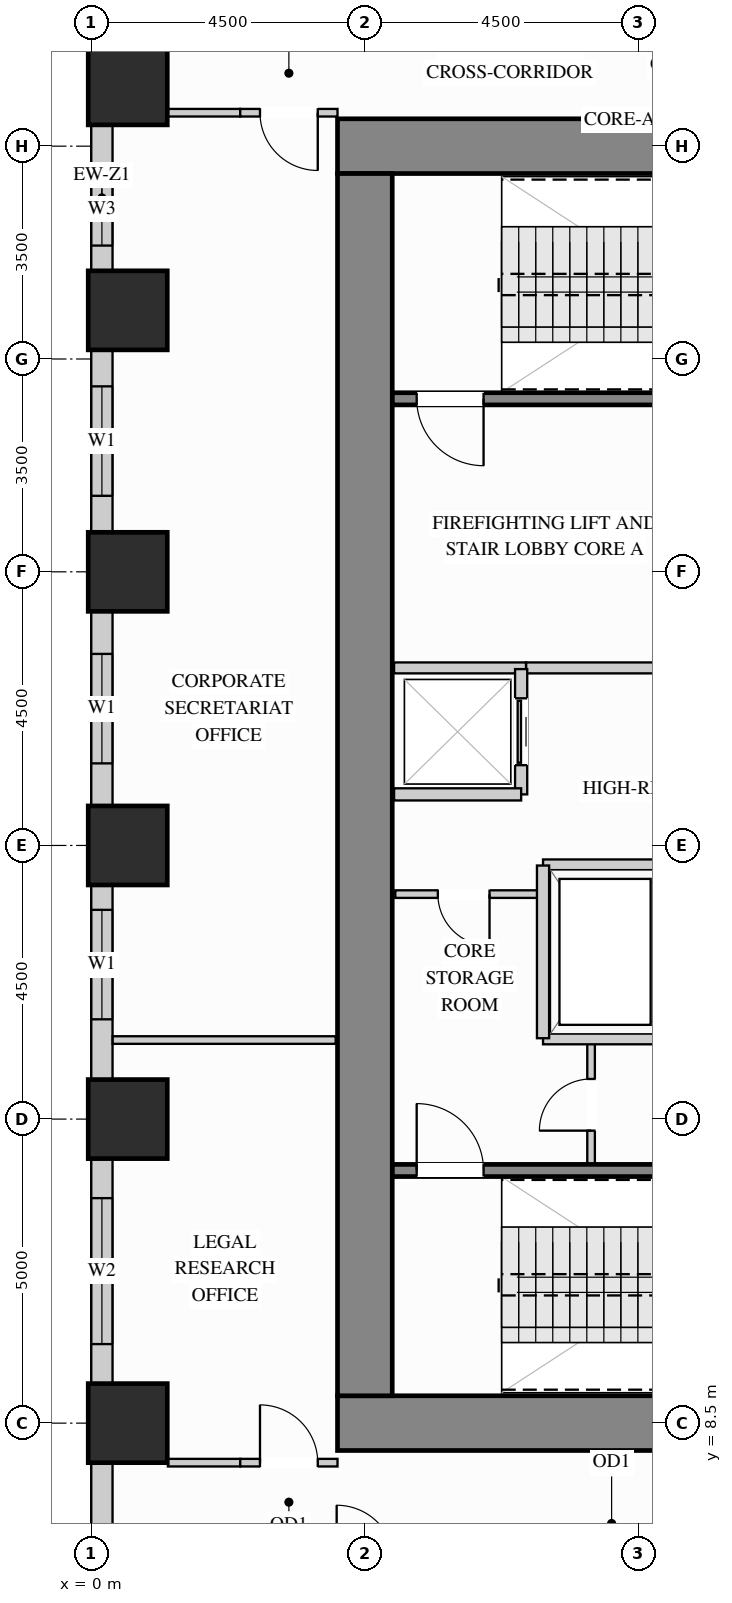
"""IFC4 building model, lengths in metres.
Left out: names, types, materials, properties, quantities, classifications, styles, units other than length and angle.
Written with IfcOpenShell. Run it as: python <this file> out.ifc"""

import sys

from ifc_helpers import new_model, si_unit, direction, frame, frame_2d, origin, origin_2d, place, context, subcontext, project, spatial, rectangle, extrude, source, transform, mapped, element, fill, save


model = new_model("IFC4")
c1 = context("Model", 3, precision=1e-05, world=origin(), true_north=direction((0.0, 1.0)))
c2 = subcontext(c1, "Body", "Model", "MODEL_VIEW")
j1 = project(units=[si_unit("LENGTHUNIT", "METRE"), si_unit("PLANEANGLEUNIT", "RADIAN")], contexts=[c1])
p1 = place(None, origin())
s1 = spatial("IfcSite", under=j1, at=p1, CompositionType="ELEMENT")
p2 = place(p1, origin())
s2 = spatial("IfcBuilding", under=s1, at=p2, CompositionType="ELEMENT")
p3 = place(p2, frame((0.0, 0.0, 29.7)))
s3 = spatial("IfcBuildingStorey", under=s2, at=p3, CompositionType="ELEMENT", Elevation=29.7)
m1 = source(origin(), c2, "Body", "SweptSolid", [
    extrude(rectangle(XDim=1.3, YDim=1.3, at=origin_2d()), origin(), (0.0, 0.0, 1.0), 3.38),
])
for number, where, z_axis, x_axis in (
    (1, (0.6, 13.5, 0.0), (0.0, 0.0, 1.0), (1.0, 0.0, 0.0)),
    (2, (0.6, 18.0, 0.0), (0.0, 0.0, 1.0), (1.0, 0.0, 0.0)),
    (3, (0.6, 22.5, 0.0), (0.0, 0.0, 1.0), (1.0, 0.0, 0.0)),
    (4, (0.6, 26.8, 0.0), (0.0, 0.0, 1.0), (1.0, 0.0, 0.0)),
    (5, (0.6, 30.5, 0.0), (0.0, 0.0, 1.0), (1.0, 0.0, 0.0)),
    (6, (0.6, 8.5, 0.0), (0.0, 0.0, 1.0), (1.0, 0.0, 0.0)),
):
    element("IfcColumn", number, at=place(p3, frame(where, z_axis=z_axis, x_axis=x_axis)), inside=s3, PredefinedType="COLUMN", context=c2, shape_type="MappedRepresentation", body=[
        mapped(m1, transform((0.0, 0.0, 0.0), x_axis=(1.0, 0.0, 0.0), y_axis=(0.0, 1.0, 0.0), z_axis=(0.0, 0.0, 1.0))),
    ])
m2 = source(origin(), c2, "Body", "SweptSolid", [
    extrude(rectangle(XDim=10.9, YDim=0.9, at=frame_2d((5.45, 0.0))), origin(), (0.0, 0.0, 1.0), 3.38),
])
for number, where, z_axis, x_axis in (
    (7, (4.05, 29.5, 0.0), (0.0, 0.0, 1.0), (1.0, 0.0, 0.0)),
    (8, (4.05, 8.5, 0.0), (0.0, 0.0, 1.0), (1.0, 0.0, 0.0)),
):
    element("IfcWall", number, at=place(p3, frame(where, z_axis=z_axis, x_axis=x_axis)), inside=s3, PredefinedType="SHEAR", context=c2, shape_type="MappedRepresentation", body=[
        mapped(m2, transform((0.0, 0.0, 0.0), x_axis=(1.0, 0.0, 0.0), y_axis=(0.0, 1.0, 0.0), z_axis=(0.0, 0.0, 1.0))),
    ])
m3 = source(origin(), c2, "Body", "SweptSolid", [
    extrude(rectangle(XDim=20.1, YDim=0.9, at=frame_2d((10.05, 0.0))), origin(), (0.0, 0.0, 1.0), 3.38),
])
p4 = place(p3, frame((4.5, 8.95, 0.0), z_axis=(0.0, 0.0, 1.0), x_axis=(0.0, 1.0, 0.0)))
e9 = element("IfcWall", 9, at=p4, inside=s3, PredefinedType="SHEAR", context=c2, shape_type="MappedRepresentation", body=[
    mapped(m3, transform((0.0, 0.0, 0.0), x_axis=(1.0, 0.0, 0.0), y_axis=(0.0, 1.0, 0.0), z_axis=(0.0, 0.0, 1.0))),
])
p5 = place(p3, frame((0.175, 29.852, 0.0), z_axis=(0.0, 0.0, 1.0), x_axis=(0.0, -1.0, 0.0)))
e10 = element("IfcWall", 10, at=p5, inside=s3, PredefinedType="SOLIDWALL", context=c2, shape_type="SweptSolid", body=[
    extrude(rectangle(XDim=2.404, YDim=0.35, at=frame_2d((1.202, 0.0))), origin(), (0.0, 0.0, 1.0), 2.51),
])
p6 = place(p5, frame((0.787, 0.0, 0.78)))
e11 = element("IfcOpeningElement", 11, at=p6, cuts=e10, PredefinedType="OPENING", context=c2, shape_type="SweptSolid", body=[
    extrude(rectangle(XDim=1.2, YDim=1.55, at=frame_2d((0.6, 0.775))), frame((0.0, 0.185, 0.0), z_axis=(0.0, -1.0, 0.0), x_axis=(1.0, 0.0, 0.0)), (0.0, 0.0, 1.0), 0.37),
])
p7 = place(p3, frame((0.175, 26.152, 0.0), z_axis=(0.0, 0.0, 1.0), x_axis=(0.0, -1.0, 0.0)))
e12 = element("IfcWall", 12, at=p7, inside=s3, PredefinedType="SOLIDWALL", context=c2, shape_type="SweptSolid", body=[
    extrude(rectangle(XDim=3.004, YDim=0.35, at=frame_2d((1.502, 0.0))), origin(), (0.0, 0.0, 1.0), 2.51),
])
p8 = place(p7, frame((0.602, 0.0, 0.78)))
e13 = element("IfcOpeningElement", 13, at=p8, cuts=e12, PredefinedType="OPENING", context=c2, shape_type="SweptSolid", body=[
    extrude(rectangle(XDim=1.8, YDim=1.55, at=frame_2d((0.9, 0.775))), frame((0.0, 0.185, 0.0), z_axis=(0.0, -1.0, 0.0), x_axis=(1.0, 0.0, 0.0)), (0.0, 0.0, 1.0), 0.37),
])
p9 = place(p3, frame((0.175, 21.852, 0.0), z_axis=(0.0, 0.0, 1.0), x_axis=(0.0, -1.0, 0.0)))
e14 = element("IfcWall", 14, at=p9, inside=s3, PredefinedType="SOLIDWALL", context=c2, shape_type="SweptSolid", body=[
    extrude(rectangle(XDim=3.204, YDim=0.35, at=frame_2d((1.602, 0.0))), origin(), (0.0, 0.0, 1.0), 2.51),
])
p10 = place(p9, frame((0.702, 0.0, 0.78)))
e15 = element("IfcOpeningElement", 15, at=p10, cuts=e14, PredefinedType="OPENING", context=c2, shape_type="SweptSolid", body=[
    extrude(rectangle(XDim=1.8, YDim=1.55, at=frame_2d((0.9, 0.775))), frame((0.0, 0.185, 0.0), z_axis=(0.0, -1.0, 0.0), x_axis=(1.0, 0.0, 0.0)), (0.0, 0.0, 1.0), 0.37),
])
p11 = place(p3, frame((0.175, 17.352, 0.0), z_axis=(0.0, 0.0, 1.0), x_axis=(0.0, -1.0, 0.0)))
e16 = element("IfcWall", 16, at=p11, inside=s3, PredefinedType="SOLIDWALL", context=c2, shape_type="SweptSolid", body=[
    extrude(rectangle(XDim=3.204, YDim=0.35, at=frame_2d((1.602, 0.0))), origin(), (0.0, 0.0, 1.0), 2.51),
])
p12 = place(p11, frame((0.411, 0.0, 0.78)))
e17 = element("IfcOpeningElement", 17, at=p12, cuts=e16, PredefinedType="OPENING", context=c2, shape_type="SweptSolid", body=[
    extrude(rectangle(XDim=1.8, YDim=1.55, at=frame_2d((0.9, 0.775))), frame((0.0, 0.185, 0.0), z_axis=(0.0, -1.0, 0.0), x_axis=(1.0, 0.0, 0.0)), (0.0, 0.0, 1.0), 0.37),
])
p13 = place(p3, frame((0.175, 12.852, 0.0), z_axis=(0.0, 0.0, 1.0), x_axis=(0.0, -1.0, 0.0)))
e18 = element("IfcWall", 18, at=p13, inside=s3, PredefinedType="SOLIDWALL", context=c2, shape_type="SweptSolid", body=[
    extrude(rectangle(XDim=3.704, YDim=0.35, at=frame_2d((1.852, 0.0))), origin(), (0.0, 0.0, 1.0), 2.51),
])
p14 = place(p13, frame((0.652, 0.0, 0.78)))
e19 = element("IfcOpeningElement", 19, at=p14, cuts=e18, PredefinedType="OPENING", context=c2, shape_type="SweptSolid", body=[
    extrude(rectangle(XDim=2.4, YDim=1.55, at=frame_2d((1.2, 0.775))), frame((0.0, 0.185, 0.0), z_axis=(0.0, -1.0, 0.0), x_axis=(1.0, 0.0, 0.0)), (0.0, 0.0, 1.0), 0.37),
])
p15 = place(p3, frame((0.175, 7.852, 0.0), z_axis=(0.0, 0.0, 1.0), x_axis=(0.0, -1.0, 0.0)))
e20 = element("IfcWall", 20, at=p15, inside=s3, PredefinedType="SOLIDWALL", context=c2, shape_type="SweptSolid", body=[
    extrude(rectangle(XDim=3.704, YDim=0.35, at=frame_2d((1.852, 0.0))), origin(), (0.0, 0.0, 1.0), 2.51),
])
p16 = place(p15, frame((2.043, 0.0, 0.78)))
e21 = element("IfcOpeningElement", 21, at=p16, cuts=e20, PredefinedType="OPENING", context=c2, shape_type="SweptSolid", body=[
    extrude(rectangle(XDim=1.2, YDim=1.55, at=frame_2d((0.6, 0.775))), frame((0.0, 0.185, 0.0), z_axis=(0.0, -1.0, 0.0), x_axis=(1.0, 0.0, 0.0)), (0.0, 0.0, 1.0), 0.37),
])
p17 = place(p3, frame((7.15, 20.92, 0.0), z_axis=(0.0, 0.0, 1.0), x_axis=(1.0, 0.0, 0.0)))
e22 = element("IfcWall", 22, at=p17, inside=s3, PredefinedType="PARTITIONING", context=c2, shape_type="SweptSolid", body=[
    extrude(rectangle(XDim=4.68, YDim=0.18, at=frame_2d((2.34, 0.0))), origin(), (0.0, 0.0, 1.0), 3.365),
])
p18 = place(p17, frame((2.2, 0.0, 0.0)))
e23 = element("IfcOpeningElement", 23, at=p18, cuts=e22, PredefinedType="OPENING", context=c2, shape_type="SweptSolid", body=[
    extrude(rectangle(XDim=1.1, YDim=2.15, at=frame_2d((0.55, 1.075))), frame((0.0, 0.1, 0.0), z_axis=(0.0, -1.0, 0.0), x_axis=(1.0, 0.0, 0.0)), (0.0, 0.0, 1.0), 0.2),
])
m4 = source(origin(), c2, "Body", "SweptSolid", [
    extrude(rectangle(XDim=2.17, YDim=0.18, at=frame_2d((1.085, 0.0))), origin(), (0.0, 0.0, 1.0), 3.365),
])
p19 = place(p3, frame((4.98, 20.92, 0.0), z_axis=(0.0, 0.0, 1.0), x_axis=(1.0, 0.0, 0.0)))
e24 = element("IfcWall", 24, at=p19, inside=s3, PredefinedType="PARTITIONING", context=c2, shape_type="MappedRepresentation", body=[
    mapped(m4, transform((0.0, 0.0, 0.0), x_axis=(1.0, 0.0, 0.0), y_axis=(0.0, 1.0, 0.0), z_axis=(0.0, 0.0, 1.0))),
])
p20 = place(p3, frame((8.22, 12.75, 0.0), z_axis=(0.0, 0.0, 1.0), x_axis=(0.0, 1.0, 0.0)))
e25 = element("IfcWall", 25, at=p20, inside=s3, PredefinedType="PARTITIONING", context=c2, shape_type="SweptSolid", body=[
    extrude(rectangle(XDim=2.07, YDim=0.125, at=frame_2d((1.035, 0.0))), origin(), (0.0, 0.0, 1.0), 3.365),
])
p21 = place(p20, frame((0.56, 0.0, 0.0)))
e26 = element("IfcOpeningElement", 26, at=p21, cuts=e25, PredefinedType="OPENING", context=c2, shape_type="SweptSolid", body=[
    extrude(rectangle(XDim=0.85, YDim=2.1, at=frame_2d((0.425, 1.05))), frame((0.0, 0.073, 0.0), z_axis=(0.0, -1.0, 0.0), x_axis=(1.0, 0.0, 0.0)), (0.0, 0.0, 1.0), 0.145),
])
p22 = place(p3, frame((5.0, 17.2, 0.0), z_axis=(0.0, 0.0, 1.0), x_axis=(1.0, 0.0, 0.0)))
e27 = element("IfcWall", 27, at=p22, inside=s3, PredefinedType="PARTITIONING", context=c2, shape_type="SweptSolid", body=[
    extrude(rectangle(XDim=2.4, YDim=0.125, at=frame_2d((1.2, 0.0))), origin(), (0.0, 0.0, 1.0), 3.365),
])
p23 = place(p22, frame((0.7, 0.0, 0.0)))
e28 = element("IfcOpeningElement", 28, at=p23, cuts=e27, PredefinedType="OPENING", context=c2, shape_type="SweptSolid", body=[
    extrude(rectangle(XDim=0.85, YDim=2.1, at=frame_2d((0.425, 1.05))), frame((0.0, 0.073, 0.0), z_axis=(0.0, -1.0, 0.0), x_axis=(1.0, 0.0, 0.0)), (0.0, 0.0, 1.0), 0.145),
])
m5 = source(origin(), c2, "Body", "SweptSolid", [
    extrude(rectangle(XDim=1.19, YDim=0.125, at=frame_2d((0.595, 0.0))), origin(), (0.0, 0.0, 1.0), 3.365),
])
p24 = place(p3, frame((1.26, 30.05, 0.0), z_axis=(0.0, 0.0, 1.0), x_axis=(1.0, 0.0, 0.0)))
e29 = element("IfcWall", 29, at=p24, inside=s3, PredefinedType="PARTITIONING", context=c2, shape_type="MappedRepresentation", body=[
    mapped(m5, transform((0.0, 0.0, 0.0), x_axis=(1.0, 0.0, 0.0), y_axis=(0.0, 1.0, 0.0), z_axis=(0.0, 0.0, 1.0))),
])
p25 = place(p3, frame((2.45, 30.05, 0.0), z_axis=(0.0, 0.0, 1.0), x_axis=(1.0, 0.0, 0.0)))
e30 = element("IfcWall", 30, at=p25, inside=s3, PredefinedType="PARTITIONING", context=c2, shape_type="SweptSolid", body=[
    extrude(rectangle(XDim=1.6, YDim=0.125, at=frame_2d((0.8, 0.0))), origin(), (0.0, 0.0, 1.0), 3.365),
])
p26 = place(p25, frame((0.325, 0.0, 0.0)))
e31 = element("IfcOpeningElement", 31, at=p26, cuts=e30, PredefinedType="OPENING", context=c2, shape_type="SweptSolid", body=[
    extrude(rectangle(XDim=0.95, YDim=2.15, at=frame_2d((0.475, 1.075))), frame((0.0, 0.073, 0.0), z_axis=(0.0, -1.0, 0.0), x_axis=(1.0, 0.0, 0.0)), (0.0, 0.0, 1.0), 0.145),
])
p27 = place(p3, frame((1.26, 7.85, 0.0), z_axis=(0.0, 0.0, 1.0), x_axis=(1.0, 0.0, 0.0)))
e32 = element("IfcWall", 32, at=p27, inside=s3, PredefinedType="PARTITIONING", context=c2, shape_type="MappedRepresentation", body=[
    mapped(m5, transform((0.0, 0.0, 0.0), x_axis=(1.0, 0.0, 0.0), y_axis=(0.0, 1.0, 0.0), z_axis=(0.0, 0.0, 1.0))),
])
p28 = place(p3, frame((2.45, 7.85, 0.0), z_axis=(0.0, 0.0, 1.0), x_axis=(1.0, 0.0, 0.0)))
e33 = element("IfcWall", 33, at=p28, inside=s3, PredefinedType="PARTITIONING", context=c2, shape_type="SweptSolid", body=[
    extrude(rectangle(XDim=1.6, YDim=0.125, at=frame_2d((0.8, 0.0))), origin(), (0.0, 0.0, 1.0), 3.365),
])
p29 = place(p28, frame((0.325, 0.0, 0.0)))
e34 = element("IfcOpeningElement", 34, at=p29, cuts=e33, PredefinedType="OPENING", context=c2, shape_type="SweptSolid", body=[
    extrude(rectangle(XDim=0.95, YDim=2.15, at=frame_2d((0.475, 1.075))), frame((0.0, 0.073, 0.0), z_axis=(0.0, -1.0, 0.0), x_axis=(1.0, 0.0, 0.0)), (0.0, 0.0, 1.0), 0.145),
])
m6 = source(origin(), c2, "Body", "SweptSolid", [
    extrude(rectangle(XDim=3.668, YDim=0.125, at=frame_2d((1.834, 0.0))), origin(), (0.0, 0.0, 1.0), 3.365),
])
p30 = place(p3, frame((0.352, 14.8, 0.0), z_axis=(0.0, 0.0, 1.0), x_axis=(1.0, 0.0, 0.0)))
e35 = element("IfcWall", 35, at=p30, inside=s3, PredefinedType="PARTITIONING", context=c2, shape_type="MappedRepresentation", body=[
    mapped(m6, transform((0.0, 0.0, 0.0), x_axis=(1.0, 0.0, 0.0), y_axis=(0.0, 1.0, 0.0), z_axis=(0.0, 0.0, 1.0))),
])
p31 = place(p3, frame((7.07, 18.84, 0.0), z_axis=(0.0, 0.0, 1.0), x_axis=(0.0, 1.0, 0.0)))
e36 = element("IfcWall", 36, at=p31, inside=s3, PredefinedType="PARTITIONING", context=c2, shape_type="SweptSolid", body=[
    extrude(rectangle(XDim=2.06, YDim=0.2, at=frame_2d((1.03, 0.0))), origin(), (0.0, 0.0, 1.0), 3.365),
])
p32 = place(p31, frame((0.48, 0.0, 0.0)))
e37 = element("IfcOpeningElement", 37, at=p32, cuts=e36, PredefinedType="OPENING", context=c2, shape_type="SweptSolid", body=[
    extrude(rectangle(XDim=1.1, YDim=2.2, at=frame_2d((0.55, 1.1))), frame((0.0, 0.11, 0.0), z_axis=(0.0, -1.0, 0.0), x_axis=(1.0, 0.0, 0.0)), (0.0, 0.0, 1.0), 0.22),
])
m7 = source(origin(), c2, "Body", "SweptSolid", [
    extrude(rectangle(XDim=2.09, YDim=0.2, at=frame_2d((1.045, 0.0))), origin(), (0.0, 0.0, 1.0), 3.365),
])
p33 = place(p3, frame((4.98, 18.84, 0.0), z_axis=(0.0, 0.0, 1.0), x_axis=(1.0, 0.0, 0.0)))
e38 = element("IfcWall", 38, at=p33, inside=s3, PredefinedType="PARTITIONING", context=c2, shape_type="MappedRepresentation", body=[
    mapped(m7, transform((0.0, 0.0, 0.0), x_axis=(1.0, 0.0, 0.0), y_axis=(0.0, 1.0, 0.0), z_axis=(0.0, 0.0, 1.0))),
])
m8 = source(origin(), c2, "Body", "SweptSolid", [
    extrude(rectangle(XDim=2.04, YDim=0.2, at=frame_2d((1.02, 0.0))), origin(), (0.0, 0.0, 1.0), 3.365),
])
for number, where, z_axis, x_axis in (
    (39, (7.43, 17.67, 0.0), (0.0, 0.0, 1.0), (1.0, 0.0, 0.0)),
    (40, (7.43, 14.83, 0.0), (0.0, 0.0, 1.0), (1.0, 0.0, 0.0)),
):
    element("IfcWall", number, at=place(p3, frame(where, z_axis=z_axis, x_axis=x_axis)), inside=s3, PredefinedType="PARTITIONING", context=c2, shape_type="MappedRepresentation", body=[
        mapped(m8, transform((0.0, 0.0, 0.0), x_axis=(1.0, 0.0, 0.0), y_axis=(0.0, 1.0, 0.0), z_axis=(0.0, 0.0, 1.0))),
    ])
m9 = source(origin(), c2, "Body", "SweptSolid", [
    extrude(rectangle(XDim=2.84, YDim=0.2, at=frame_2d((1.42, 0.0))), origin(), (0.0, 0.0, 1.0), 3.365),
])
p34 = place(p3, frame((7.43, 14.83, 0.0), z_axis=(0.0, 0.0, 1.0), x_axis=(0.0, 1.0, 0.0)))
e41 = element("IfcWall", 41, at=p34, inside=s3, PredefinedType="PARTITIONING", context=c2, shape_type="MappedRepresentation", body=[
    mapped(m9, transform((0.0, 0.0, 0.0), x_axis=(1.0, 0.0, 0.0), y_axis=(0.0, 1.0, 0.0), z_axis=(0.0, 0.0, 1.0))),
])
p35 = place(p3, frame((4.952, 12.655, 0.0), z_axis=(0.0, 0.0, 1.0), x_axis=(1.0, 0.0, 0.0)))
e42 = element("IfcWall", 42, at=p35, inside=s3, PredefinedType="SHEAR", context=c2, shape_type="SweptSolid", body=[
    extrude(rectangle(XDim=7.453, YDim=0.2, at=frame_2d((3.727, 0.0))), origin(), (0.0, 0.0, 1.0), 3.38),
])
p36 = place(p35, frame((0.4, 0.0, 0.0)))
e43 = element("IfcOpeningElement", 43, at=p36, cuts=e42, PredefinedType="OPENING", context=c2, shape_type="SweptSolid", body=[
    extrude(rectangle(XDim=1.1, YDim=2.15, at=frame_2d((0.55, 1.075))), frame((0.0, 0.11, 0.0), z_axis=(0.0, -1.0, 0.0), x_axis=(1.0, 0.0, 0.0)), (0.0, 0.0, 1.0), 0.22),
])
p37 = place(p3, frame((4.952, 25.345, 0.0), z_axis=(0.0, 0.0, 1.0), x_axis=(1.0, 0.0, 0.0)))
e44 = element("IfcWall", 44, at=p37, inside=s3, PredefinedType="SHEAR", context=c2, shape_type="SweptSolid", body=[
    extrude(rectangle(XDim=7.453, YDim=0.2, at=frame_2d((3.727, 0.0))), origin(), (0.0, 0.0, 1.0), 3.38),
])
p38 = place(p37, frame((0.4, 0.0, 0.0)))
e45 = element("IfcOpeningElement", 45, at=p38, cuts=e44, PredefinedType="OPENING", context=c2, shape_type="SweptSolid", body=[
    extrude(rectangle(XDim=1.1, YDim=2.15, at=frame_2d((0.55, 1.075))), frame((0.0, 0.11, 0.0), z_axis=(0.0, -1.0, 0.0), x_axis=(1.0, 0.0, 0.0)), (0.0, 0.0, 1.0), 0.22),
])
m10 = source(origin(), c2, "Body", "SweptSolid", [
    extrude(rectangle(XDim=1.1, YDim=2.2, at=frame_2d((0.55, 1.1))), frame((0.0, 0.025, 0.0), z_axis=(0.0, -1.0, 0.0), x_axis=(1.0, 0.0, 0.0)), (0.0, 0.0, 1.0), 0.05),
])
p39 = place(p32, origin())
e46 = element("IfcDoor", 46, at=p39, inside=s3, OperationType="SLIDING_TO_LEFT", PredefinedType="DOOR", context=c2, shape_type="MappedRepresentation", body=[
    mapped(m10, transform((0.0, 0.0, 0.0), x_axis=(1.0, 0.0, 0.0), y_axis=(0.0, 1.0, 0.0), z_axis=(0.0, 0.0, 1.0))),
])
fill(e37, e46)
m11 = source(origin(), c2, "Body", "SweptSolid", [
    extrude(rectangle(XDim=0.95, YDim=2.15, at=frame_2d((0.475, 1.075))), frame((0.0, 0.025, 0.0), z_axis=(0.0, -1.0, 0.0), x_axis=(1.0, 0.0, 0.0)), (0.0, 0.0, 1.0), 0.05),
])
p40 = place(p29, origin())
e47 = element("IfcDoor", 47, at=p40, inside=s3, OperationType="SINGLE_SWING_LEFT", PredefinedType="DOOR", context=c2, shape_type="MappedRepresentation", body=[
    mapped(m11, transform((0.0, 0.0, 0.0), x_axis=(1.0, 0.0, 0.0), y_axis=(0.0, 1.0, 0.0), z_axis=(0.0, 0.0, 1.0))),
])
fill(e34, e47)
p41 = place(p26, origin())
e48 = element("IfcDoor", 48, at=p41, inside=s3, OperationType="SINGLE_SWING_RIGHT", PredefinedType="DOOR", context=c2, shape_type="MappedRepresentation", body=[
    mapped(m11, transform((0.0, 0.0, 0.0), x_axis=(1.0, 0.0, 0.0), y_axis=(0.0, 1.0, 0.0), z_axis=(0.0, 0.0, 1.0))),
])
fill(e31, e48)
m12 = source(origin(), c2, "Body", "SweptSolid", [
    extrude(rectangle(XDim=0.85, YDim=2.1, at=frame_2d((0.425, 1.05))), frame((0.0, 0.025, 0.0), z_axis=(0.0, -1.0, 0.0), x_axis=(1.0, 0.0, 0.0)), (0.0, 0.0, 1.0), 0.05),
])
p42 = place(p23, origin())
e49 = element("IfcDoor", 49, at=p42, inside=s3, OperationType="SINGLE_SWING_RIGHT", PredefinedType="DOOR", context=c2, shape_type="MappedRepresentation", body=[
    mapped(m12, transform((0.0, 0.0, 0.0), x_axis=(1.0, 0.0, 0.0), y_axis=(0.0, 1.0, 0.0), z_axis=(0.0, 0.0, 1.0))),
])
fill(e28, e49)
p43 = place(p21, origin())
e50 = element("IfcDoor", 50, at=p43, inside=s3, OperationType="SINGLE_SWING_LEFT", PredefinedType="DOOR", context=c2, shape_type="MappedRepresentation", body=[
    mapped(m12, transform((0.0, 0.0, 0.0), x_axis=(1.0, 0.0, 0.0), y_axis=(0.0, 1.0, 0.0), z_axis=(0.0, 0.0, 1.0))),
])
fill(e26, e50)
m13 = source(origin(), c2, "Body", "SweptSolid", [
    extrude(rectangle(XDim=1.1, YDim=2.15, at=frame_2d((0.55, 1.075))), frame((0.0, 0.025, 0.0), z_axis=(0.0, -1.0, 0.0), x_axis=(1.0, 0.0, 0.0)), (0.0, 0.0, 1.0), 0.05),
])
p44 = place(p36, origin())
e51 = element("IfcDoor", 51, at=p44, inside=s3, OperationType="SINGLE_SWING_LEFT", PredefinedType="DOOR", context=c2, shape_type="MappedRepresentation", body=[
    mapped(m13, transform((0.0, 0.0, 0.0), x_axis=(1.0, 0.0, 0.0), y_axis=(0.0, 1.0, 0.0), z_axis=(0.0, 0.0, 1.0))),
])
fill(e43, e51)
p45 = place(p38, origin())
e52 = element("IfcDoor", 52, at=p45, inside=s3, OperationType="SINGLE_SWING_RIGHT", PredefinedType="DOOR", context=c2, shape_type="MappedRepresentation", body=[
    mapped(m13, transform((0.0, 0.0, 0.0), x_axis=(1.0, 0.0, 0.0), y_axis=(0.0, 1.0, 0.0), z_axis=(0.0, 0.0, 1.0))),
])
fill(e45, e52)
m14 = source(origin(), c2, "Body", "SweptSolid", [
    extrude(rectangle(XDim=1.8, YDim=1.55, at=frame_2d((0.9, 0.775))), frame((0.0, 0.03, 0.0), z_axis=(0.0, -1.0, 0.0), x_axis=(1.0, 0.0, 0.0)), (0.0, 0.0, 1.0), 0.06),
])
p46 = place(p8, origin())
e53 = element("IfcWindow", 53, at=p46, inside=s3, PartitioningType="SINGLE_PANEL", PredefinedType="WINDOW", context=c2, shape_type="MappedRepresentation", body=[
    mapped(m14, transform((0.0, 0.0, 0.0), x_axis=(1.0, 0.0, 0.0), y_axis=(0.0, 1.0, 0.0), z_axis=(0.0, 0.0, 1.0))),
])
fill(e13, e53)
p47 = place(p10, origin())
e54 = element("IfcWindow", 54, at=p47, inside=s3, PartitioningType="SINGLE_PANEL", PredefinedType="WINDOW", context=c2, shape_type="MappedRepresentation", body=[
    mapped(m14, transform((0.0, 0.0, 0.0), x_axis=(1.0, 0.0, 0.0), y_axis=(0.0, 1.0, 0.0), z_axis=(0.0, 0.0, 1.0))),
])
fill(e15, e54)
p48 = place(p12, origin())
e55 = element("IfcWindow", 55, at=p48, inside=s3, PartitioningType="SINGLE_PANEL", PredefinedType="WINDOW", context=c2, shape_type="MappedRepresentation", body=[
    mapped(m14, transform((0.0, 0.0, 0.0), x_axis=(1.0, 0.0, 0.0), y_axis=(0.0, 1.0, 0.0), z_axis=(0.0, 0.0, 1.0))),
])
fill(e17, e55)
m15 = source(origin(), c2, "Body", "SweptSolid", [
    extrude(rectangle(XDim=2.4, YDim=1.55, at=frame_2d((1.2, 0.775))), frame((0.0, 0.03, 0.0), z_axis=(0.0, -1.0, 0.0), x_axis=(1.0, 0.0, 0.0)), (0.0, 0.0, 1.0), 0.06),
])
p49 = place(p14, origin())
e56 = element("IfcWindow", 56, at=p49, inside=s3, PartitioningType="SINGLE_PANEL", PredefinedType="WINDOW", context=c2, shape_type="MappedRepresentation", body=[
    mapped(m15, transform((0.0, 0.0, 0.0), x_axis=(1.0, 0.0, 0.0), y_axis=(0.0, 1.0, 0.0), z_axis=(0.0, 0.0, 1.0))),
])
fill(e19, e56)
m16 = source(origin(), c2, "Body", "SweptSolid", [
    extrude(rectangle(XDim=1.2, YDim=1.55, at=frame_2d((0.6, 0.775))), frame((0.0, 0.03, 0.0), z_axis=(0.0, -1.0, 0.0), x_axis=(1.0, 0.0, 0.0)), (0.0, 0.0, 1.0), 0.06),
])
p50 = place(p6, origin())
e57 = element("IfcWindow", 57, at=p50, inside=s3, PartitioningType="SINGLE_PANEL", PredefinedType="WINDOW", context=c2, shape_type="MappedRepresentation", body=[
    mapped(m16, transform((0.0, 0.0, 0.0), x_axis=(1.0, 0.0, 0.0), y_axis=(0.0, 1.0, 0.0), z_axis=(0.0, 0.0, 1.0))),
])
fill(e11, e57)
save(model, sys.argv[1])
